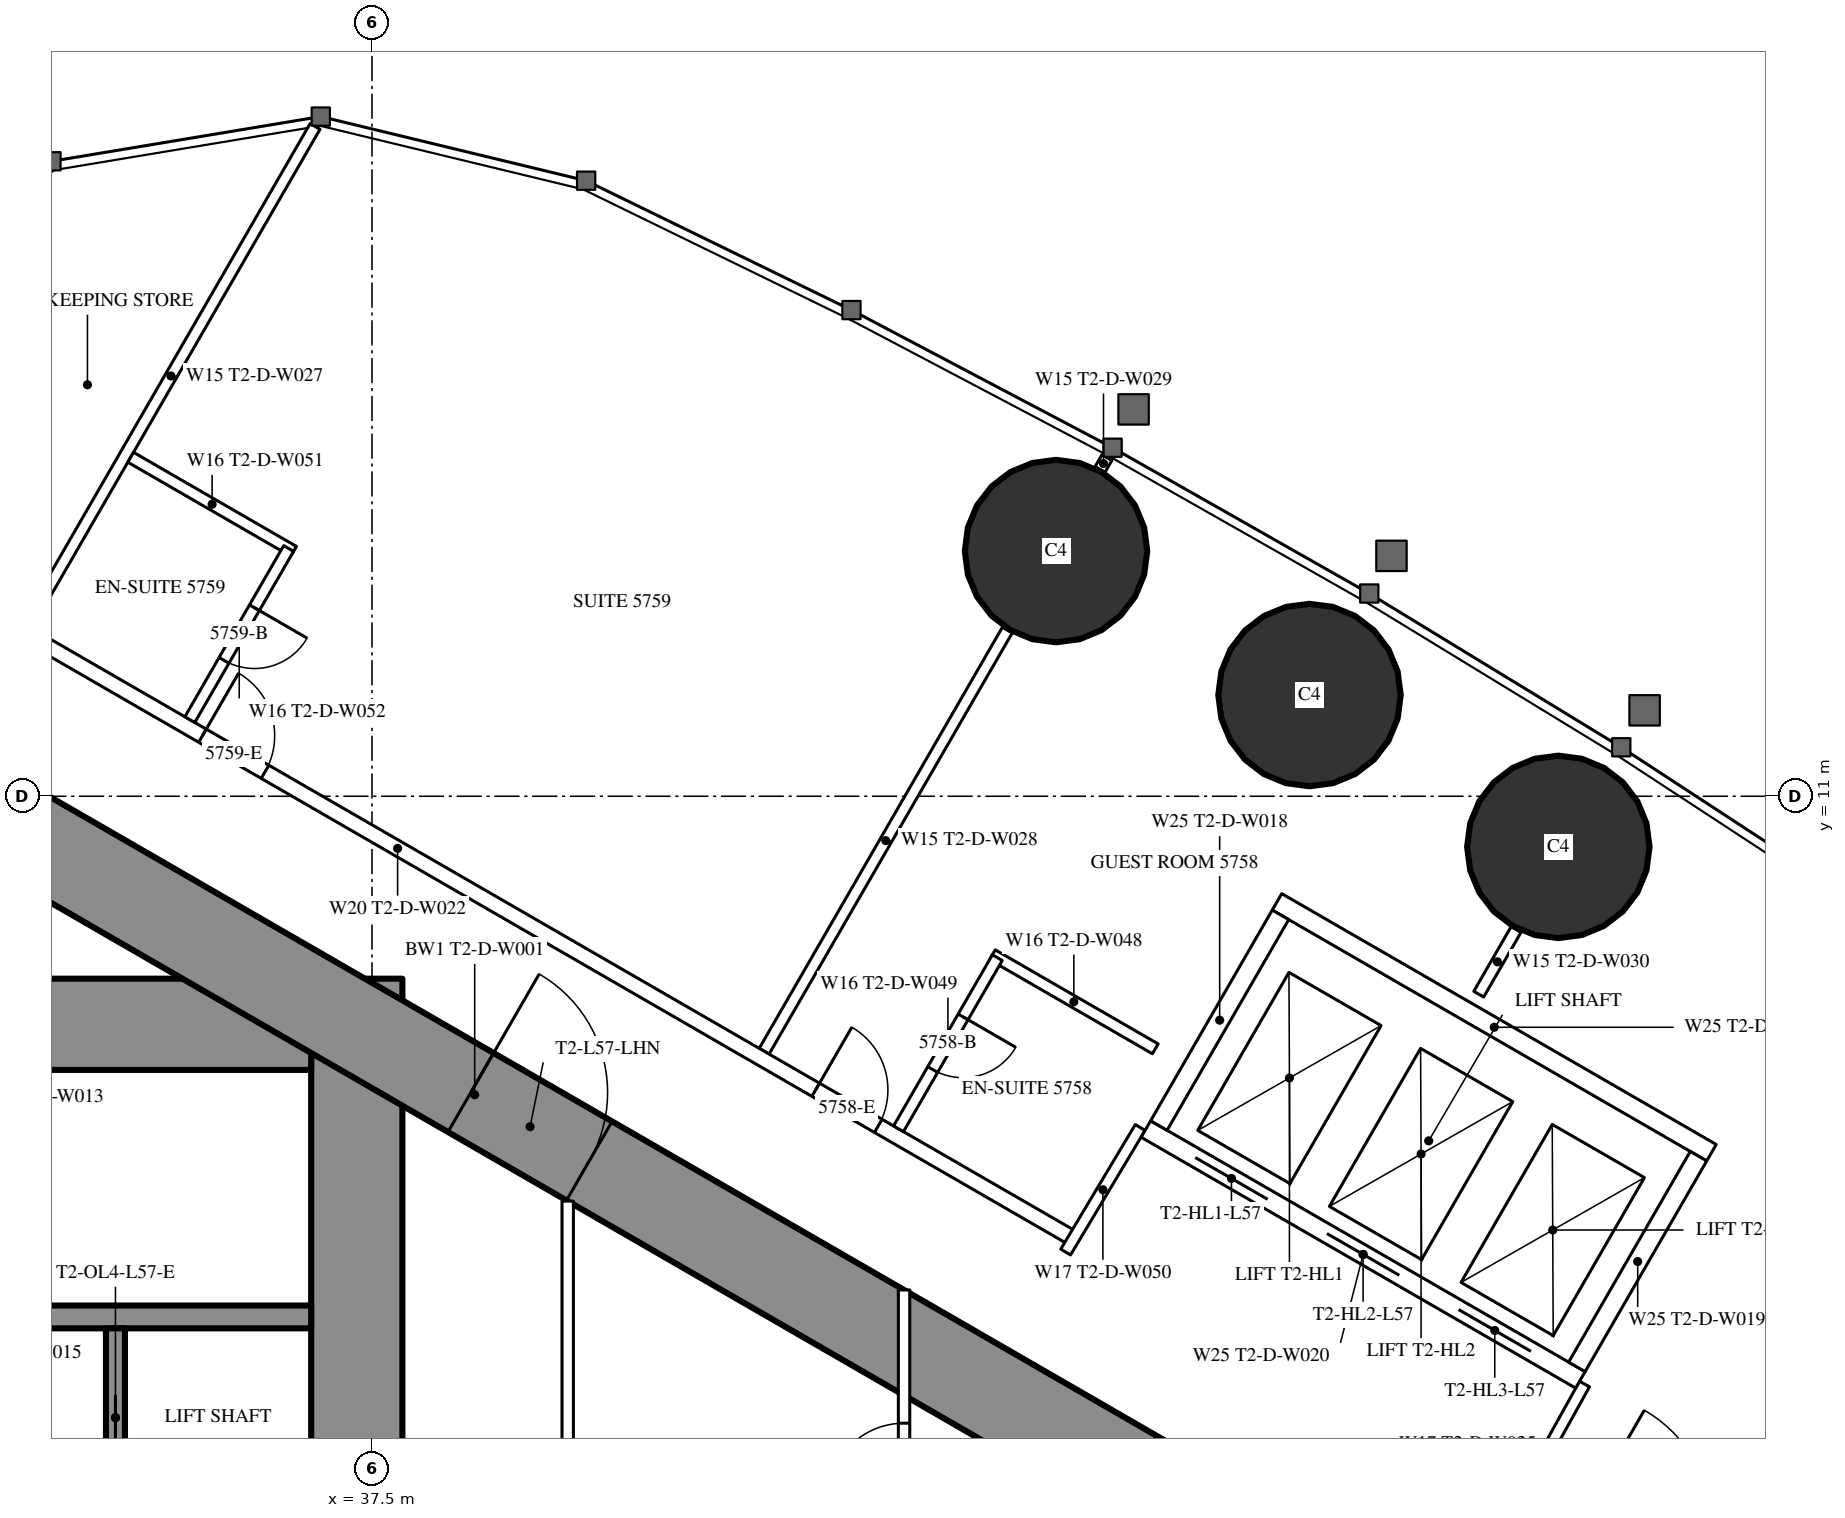
"""IFC4 building model, lengths in metres.
Left out: names, types, materials, properties, quantities, classifications, styles, units other than length and angle.
Written with IfcOpenShell. Run it as: python <this file> out.ifc"""

import sys

from ifc_helpers import new_model, si_unit, direction, frame, frame_2d, origin, origin_2d, place, context, subcontext, project, spatial, rectangle, circle, extrude, element, fill, save


model = new_model("IFC4")
c1 = context("Model", 3, precision=1e-05, world=origin(), true_north=direction((0.0, 1.0)))
c2 = subcontext(c1, "Body", "Model", "MODEL_VIEW")
j1 = project(units=[si_unit("LENGTHUNIT", "METRE"), si_unit("PLANEANGLEUNIT", "RADIAN")], contexts=[c1])
p1 = place(None, origin())
s1 = spatial("IfcSite", under=j1, at=p1, CompositionType="ELEMENT")
p2 = place(p1, origin())
s2 = spatial("IfcBuilding", under=s1, at=p2, CompositionType="ELEMENT")
p3 = place(p2, frame((0.0, 0.0, 215.3)))
s3 = spatial("IfcBuildingStorey", under=s2, at=p3, CompositionType="ELEMENT", Elevation=215.3)
for number, where, z_axis, x_axis in (
    (1, (53.108, 10.334, 0.0), (0.0, 0.0, 1.0), (1.0, 0.0, 0.0)),
    (2, (49.834, 12.332, 0.0), (0.0, 0.0, 1.0), (1.0, 0.0, 0.0)),
    (3, (46.499, 14.226, 0.0), (0.0, 0.0, 1.0), (1.0, 0.0, 0.0)),
):
    element("IfcColumn", number, at=place(p3, frame(where, z_axis=z_axis, x_axis=x_axis)), inside=s3, PredefinedType="COLUMN", context=c2, shape_type="SweptSolid", body=[
        extrude(circle(Radius=1.2, at=origin_2d()), origin(), (0.0, 0.0, 1.0), 3.6),
    ])
p4 = place(p3, frame((37.3, -8.6, 0.0), z_axis=(0.0, 0.0, 1.0), x_axis=(0.0, 1.0, 0.0)))
e4 = element("IfcWall", 4, at=p4, inside=s3, PredefinedType="SHEAR", context=c2, shape_type="SweptSolid", body=[
    extrude(rectangle(XDim=17.2, YDim=1.2, at=frame_2d((8.6, 0.0))), origin(), (0.0, 0.0, 1.0), 3.6),
])
p5 = place(p4, frame((7.7, 0.0, 0.0)))
e5 = element("IfcOpeningElement", 5, at=p5, cuts=e4, PredefinedType="OPENING", context=c2, shape_type="SweptSolid", body=[
    extrude(rectangle(XDim=1.8, YDim=2.2, at=frame_2d((0.9, 1.1))), frame((0.0, 0.61, 0.0), z_axis=(0.0, -1.0, 0.0), x_axis=(1.0, 0.0, 0.0)), (0.0, 0.0, 1.0), 1.22),
])
p6 = place(p3, frame((28.3, 8.0, 0.0), z_axis=(0.0, 0.0, 1.0), x_axis=(1.0, 0.0, 0.0)))
e6 = element("IfcWall", 6, at=p6, inside=s3, PredefinedType="SHEAR", context=c2, shape_type="SweptSolid", body=[
    extrude(rectangle(XDim=8.4, YDim=1.2, at=frame_2d((4.2, 0.0))), origin(), (0.0, 0.0, 1.0), 3.6),
])
p7 = place(p6, frame((0.25, 0.0, 0.0)))
e7 = element("IfcOpeningElement", 7, at=p7, cuts=e6, PredefinedType="OPENING", context=c2, shape_type="SweptSolid", body=[
    extrude(rectangle(XDim=1.0, YDim=2.2, at=frame_2d((0.5, 1.1))), frame((0.0, 0.61, 0.0), z_axis=(0.0, -1.0, 0.0), x_axis=(1.0, 0.0, 0.0)), (0.0, 0.0, 1.0), 1.22),
])
p8 = place(p3, frame((28.3, 4.15, 0.0), z_axis=(0.0, 0.0, 1.0), x_axis=(1.0, 0.0, 0.0)))
e8 = element("IfcWall", 8, at=p8, inside=s3, PredefinedType="SHEAR", context=c2, shape_type="SweptSolid", body=[
    extrude(rectangle(XDim=8.4, YDim=0.3, at=frame_2d((4.2, 0.0))), origin(), (0.0, 0.0, 1.0), 3.6),
])
p9 = place(p3, frame((34.125, 1.65, 0.0), z_axis=(0.0, 0.0, 1.0), x_axis=(0.0, 1.0, 0.0)))
e9 = element("IfcWall", 9, at=p9, inside=s3, PredefinedType="SHEAR", context=c2, shape_type="SweptSolid", body=[
    extrude(rectangle(XDim=2.35, YDim=0.25, at=frame_2d((1.175, 0.0))), origin(), (0.0, 0.0, 1.0), 3.6),
])
p10 = place(p9, frame((0.875, 0.0, 0.0)))
e10 = element("IfcOpeningElement", 10, at=p10, cuts=e9, PredefinedType="OPENING", context=c2, shape_type="SweptSolid", body=[
    extrude(rectangle(XDim=0.6, YDim=2.0, at=frame_2d((0.3, 1.0))), frame((0.0, 0.135, 0.0), z_axis=(0.0, -1.0, 0.0), x_axis=(1.0, 0.0, 0.0)), (0.0, 0.0, 1.0), 0.27),
])
p11 = place(p3, frame((27.2, 13.8, 0.0), z_axis=(0.0, 0.0, 1.0), x_axis=(0.866024515034, -0.500001539357, 0.0)))
e11 = element("IfcWall", 11, at=p11, inside=s3, PredefinedType="SHEAR", context=c2, shape_type="SweptSolid", body=[
    extrude(rectangle(XDim=26.907, YDim=1.2, at=frame_2d((13.454, 0.0))), origin(), (0.0, 0.0, 1.0), 3.6),
])
p12 = place(p11, frame((4.6, 0.0, 0.0)))
e12 = element("IfcOpeningElement", 12, at=p12, cuts=e11, PredefinedType="OPENING", context=c2, shape_type="SweptSolid", body=[
    extrude(rectangle(XDim=1.0, YDim=2.2, at=frame_2d((0.5, 1.1))), frame((0.0, 0.61, 0.0), z_axis=(0.0, -1.0, 0.0), x_axis=(1.0, 0.0, 0.0)), (0.0, 0.0, 1.0), 1.22),
])
p13 = place(p11, frame((13.395, 0.0, 0.0)))
e13 = element("IfcOpeningElement", 13, at=p13, cuts=e11, PredefinedType="OPENING", context=c2, shape_type="SweptSolid", body=[
    extrude(rectangle(XDim=1.8, YDim=2.2, at=frame_2d((0.9, 1.1))), frame((0.0, 0.61, 0.0), z_axis=(0.0, -1.0, 0.0), x_axis=(1.0, 0.0, 0.0)), (0.0, 0.0, 1.0), 1.22),
])
p14 = place(p3, frame((32.96, 13.246, 0.0), z_axis=(0.0, 0.0, 1.0), x_axis=(0.500000236886, 0.866025267018, 0.0)))
e14 = element("IfcWall", 14, at=p14, inside=s3, PredefinedType="PARTITIONING", context=c2, shape_type="SweptSolid", body=[
    extrude(rectangle(XDim=7.583, YDim=0.15, at=frame_2d((3.791, 0.0))), origin(), (0.0, 0.0, 1.0), 3.35),
])
p15 = place(p3, frame((42.66, 7.646, 0.0), z_axis=(0.0, 0.0, 1.0), x_axis=(0.499996592859, 0.866027370889, 0.0)))
e15 = element("IfcWall", 15, at=p15, inside=s3, PredefinedType="PARTITIONING", context=c2, shape_type="SweptSolid", body=[
    extrude(rectangle(XDim=6.398, YDim=0.15, at=frame_2d((3.199, 0.0))), origin(), (0.0, 0.0, 1.0), 2.45),
])
p16 = place(p3, frame((47.079, 15.3, 0.0), z_axis=(0.0, 0.0, 1.0), x_axis=(0.499212083968, 0.866479829667, 0.0)))
e16 = element("IfcWall", 16, at=p16, inside=s3, PredefinedType="PARTITIONING", context=c2, shape_type="SweptSolid", body=[
    extrude(rectangle(XDim=0.179, YDim=0.15, at=frame_2d((0.09, 0.0))), origin(), (0.0, 0.0, 1.0), 2.45),
])
p17 = place(p3, frame((52.06, 8.396, 0.0), z_axis=(0.0, 0.0, 1.0), x_axis=(0.500095379624, 0.865970329329, 0.0)))
e17 = element("IfcWall", 17, at=p17, inside=s3, PredefinedType="PARTITIONING", context=c2, shape_type="SweptSolid", body=[
    extrude(rectangle(XDim=0.982, YDim=0.15, at=frame_2d((0.491, 0.0))), origin(), (0.0, 0.0, 1.0), 3.35),
])
p18 = place(p3, frame((28.959, 15.44, 0.0), z_axis=(0.0, 0.0, 1.0), x_axis=(0.866028936079, -0.499993881836, 0.0)))
e18 = element("IfcWall", 18, at=p18, inside=s3, PredefinedType="PARTITIONING", context=c2, shape_type="SweptSolid", body=[
    extrude(rectangle(XDim=20.503, YDim=0.2, at=frame_2d((10.251, 0.0))), origin(), (0.0, 0.0, 1.0), 3.35),
])
p19 = place(p18, frame((16.603, 0.0, 0.0)))
e19 = element("IfcOpeningElement", 19, at=p19, cuts=e18, PredefinedType="OPENING", context=c2, shape_type="SweptSolid", body=[
    extrude(rectangle(XDim=0.95, YDim=2.2, at=frame_2d((0.475, 1.1))), frame((0.0, 0.11, 0.0), z_axis=(0.0, -1.0, 0.0), x_axis=(1.0, 0.0, 0.0)), (0.0, 0.0, 1.0), 0.22),
])
p20 = place(p18, frame((7.287, 0.0, 0.0)))
e20 = element("IfcOpeningElement", 20, at=p20, cuts=e18, PredefinedType="OPENING", context=c2, shape_type="SweptSolid", body=[
    extrude(rectangle(XDim=0.95, YDim=2.2, at=frame_2d((0.475, 1.1))), frame((0.0, 0.11, 0.0), z_axis=(0.0, -1.0, 0.0), x_axis=(1.0, 0.0, 0.0)), (0.0, 0.0, 1.0), 0.22),
])
p21 = place(p18, frame((2.244, 0.0, 0.0)))
e21 = element("IfcOpeningElement", 21, at=p21, cuts=e18, PredefinedType="OPENING", context=c2, shape_type="SweptSolid", body=[
    extrude(rectangle(XDim=1.8, YDim=2.2, at=frame_2d((0.9, 1.1))), frame((0.0, 0.11, 0.0), z_axis=(0.0, -1.0, 0.0), x_axis=(1.0, 0.0, 0.0)), (0.0, 0.0, 1.0), 0.22),
])
p22 = place(p3, frame((47.606, 6.642, 0.0), z_axis=(0.0, 0.0, 1.0), x_axis=(-0.51353662755, -0.858067673418, 0.0)))
e22 = element("IfcWall", 22, at=p22, inside=s3, PredefinedType="PARTITIONING", context=c2, shape_type="SweptSolid", body=[
    extrude(rectangle(XDim=1.91, YDim=0.15, at=frame_2d((0.955, 0.0))), origin(), (0.0, 0.0, 1.0), 3.35),
])
p23 = place(p3, frame((52.576, 1.689, 0.0), z_axis=(0.0, 0.0, 1.0), x_axis=(0.485424724123, 0.874278466629, 0.0)))
e23 = element("IfcWall", 23, at=p23, inside=s3, PredefinedType="PARTITIONING", context=c2, shape_type="SweptSolid", body=[
    extrude(rectangle(XDim=1.805, YDim=0.15, at=frame_2d((0.903, 0.0))), origin(), (0.0, 0.0, 1.0), 3.35),
])
p24 = place(p3, frame((45.662, 8.914, 0.0), z_axis=(0.0, 0.0, 1.0), x_axis=(0.86604923931, -0.499958713387, 0.0)))
e24 = element("IfcWall", 24, at=p24, inside=s3, PredefinedType="PARTITIONING", context=c2, shape_type="SweptSolid", body=[
    extrude(rectangle(XDim=2.475, YDim=0.15, at=frame_2d((1.237, 0.0))), origin(), (0.0, 0.0, 1.0), 3.35),
])
p25 = place(p3, frame((44.427, 6.625, 0.0), z_axis=(0.0, 0.0, 1.0), x_axis=(0.500006934395, 0.866021400173, 0.0)))
e25 = element("IfcWall", 25, at=p25, inside=s3, PredefinedType="PARTITIONING", context=c2, shape_type="SweptSolid", body=[
    extrude(rectangle(XDim=2.6, YDim=0.15, at=frame_2d((1.3, 0.0))), origin(), (0.0, 0.0, 1.0), 3.35),
])
p26 = place(p25, frame((0.9, 0.0, 0.0)))
e26 = element("IfcOpeningElement", 26, at=p26, cuts=e25, PredefinedType="OPENING", context=c2, shape_type="SweptSolid", body=[
    extrude(rectangle(XDim=0.8, YDim=2.2, at=frame_2d((0.4, 1.1))), frame((0.0, 0.085, 0.0), z_axis=(0.0, -1.0, 0.0), x_axis=(1.0, 0.0, 0.0)), (0.0, 0.0, 1.0), 0.17),
])
p27 = place(p3, frame((34.325, 15.46, 0.0), z_axis=(0.0, 0.0, 1.0), x_axis=(0.866031185235, -0.4999899861, 0.0)))
e27 = element("IfcWall", 27, at=p27, inside=s3, PredefinedType="PARTITIONING", context=c2, shape_type="SweptSolid", body=[
    extrude(rectangle(XDim=2.475, YDim=0.15, at=frame_2d((1.238, 0.0))), origin(), (0.0, 0.0, 1.0), 3.35),
])
p28 = place(p3, frame((35.104, 12.008, 0.0), z_axis=(0.0, 0.0, 1.0), x_axis=(0.500047596559, 0.865997922154, 0.0)))
e28 = element("IfcWall", 28, at=p28, inside=s3, PredefinedType="PARTITIONING", context=c2, shape_type="SweptSolid", body=[
    extrude(rectangle(XDim=2.6, YDim=0.15, at=frame_2d((1.3, 0.0))), origin(), (0.0, 0.0, 1.0), 3.35),
])
p29 = place(p28, frame((0.9, 0.0, 0.0)))
e29 = element("IfcOpeningElement", 29, at=p29, cuts=e28, PredefinedType="OPENING", context=c2, shape_type="SweptSolid", body=[
    extrude(rectangle(XDim=0.8, YDim=2.2, at=frame_2d((0.4, 1.1))), frame((0.0, 0.085, 0.0), z_axis=(0.0, -1.0, 0.0), x_axis=(1.0, 0.0, 0.0)), (0.0, 0.0, 1.0), 0.17),
])
p30 = place(p3, frame((40.075, -5.674, 0.0), z_axis=(0.0, 0.0, 1.0), x_axis=(0.0, 1.0, 0.0)))
e30 = element("IfcWall", 30, at=p30, inside=s3, PredefinedType="PARTITIONING", context=c2, shape_type="SweptSolid", body=[
    extrude(rectangle(XDim=11.348, YDim=0.15, at=frame_2d((5.674, 0.0))), origin(), (0.0, 0.0, 1.0), 3.35),
])
p31 = place(p30, frame((4.774, 0.0, 0.0)))
e31 = element("IfcOpeningElement", 31, at=p31, cuts=e30, PredefinedType="OPENING", context=c2, shape_type="SweptSolid", body=[
    extrude(rectangle(XDim=1.8, YDim=2.2, at=frame_2d((0.9, 1.1))), frame((0.0, 0.085, 0.0), z_axis=(0.0, -1.0, 0.0), x_axis=(1.0, 0.0, 0.0)), (0.0, 0.0, 1.0), 0.17),
])
p32 = place(p3, frame((44.5, -4.505, 0.0), z_axis=(0.0, 0.0, 1.0), x_axis=(0.0, 1.0, 0.0)))
e32 = element("IfcWall", 32, at=p32, inside=s3, PredefinedType="PARTITIONING", context=c2, shape_type="SweptSolid", body=[
    extrude(rectangle(XDim=9.009, YDim=0.15, at=frame_2d((4.505, 0.0))), origin(), (0.0, 0.0, 1.0), 3.35),
])
p33 = place(p32, frame((1.752, 0.0, 0.0)))
e33 = element("IfcOpeningElement", 33, at=p33, cuts=e32, PredefinedType="OPENING", context=c2, shape_type="SweptSolid", body=[
    extrude(rectangle(XDim=1.0, YDim=2.2, at=frame_2d((0.5, 1.1))), frame((0.0, 0.085, 0.0), z_axis=(0.0, -1.0, 0.0), x_axis=(1.0, 0.0, 0.0)), (0.0, 0.0, 1.0), 0.17),
])
p34 = place(p32, frame((6.257, 0.0, 0.0)))
e34 = element("IfcOpeningElement", 34, at=p34, cuts=e32, PredefinedType="OPENING", context=c2, shape_type="SweptSolid", body=[
    extrude(rectangle(XDim=1.0, YDim=2.2, at=frame_2d((0.5, 1.1))), frame((0.0, 0.085, 0.0), z_axis=(0.0, -1.0, 0.0), x_axis=(1.0, 0.0, 0.0)), (0.0, 0.0, 1.0), 0.17),
])
p35 = place(p3, frame((47.681, 6.622, 0.0), z_axis=(0.0, 0.0, 1.0), x_axis=(0.86603344179, -0.499986077507, 0.0)))
e35 = element("IfcWall", 35, at=p35, inside=s3, PredefinedType="PARTITIONING", context=c2, shape_type="SweptSolid", body=[
    extrude(rectangle(XDim=6.6, YDim=0.25, at=frame_2d((3.3, 0.0))), origin(), (0.0, 0.0, 1.0), 3.35),
])
p36 = place(p35, frame((0.75, 0.0, 0.0)))
e36 = element("IfcOpeningElement", 36, at=p36, cuts=e35, PredefinedType="OPENING", context=c2, shape_type="SweptSolid", body=[
    extrude(rectangle(XDim=1.1, YDim=2.2, at=frame_2d((0.55, 1.1))), frame((0.0, 0.135, 0.0), z_axis=(0.0, -1.0, 0.0), x_axis=(1.0, 0.0, 0.0)), (0.0, 0.0, 1.0), 0.27),
])
p37 = place(p35, frame((2.75, 0.0, 0.0)))
e37 = element("IfcOpeningElement", 37, at=p37, cuts=e35, PredefinedType="OPENING", context=c2, shape_type="SweptSolid", body=[
    extrude(rectangle(XDim=1.1, YDim=2.2, at=frame_2d((0.55, 1.1))), frame((0.0, 0.135, 0.0), z_axis=(0.0, -1.0, 0.0), x_axis=(1.0, 0.0, 0.0)), (0.0, 0.0, 1.0), 0.27),
])
p38 = place(p35, frame((4.75, 0.0, 0.0)))
e38 = element("IfcOpeningElement", 38, at=p38, cuts=e35, PredefinedType="OPENING", context=c2, shape_type="SweptSolid", body=[
    extrude(rectangle(XDim=1.1, YDim=2.2, at=frame_2d((0.55, 1.1))), frame((0.0, 0.135, 0.0), z_axis=(0.0, -1.0, 0.0), x_axis=(1.0, 0.0, 0.0)), (0.0, 0.0, 1.0), 0.27),
])
p39 = place(p3, frame((49.406, 9.611, 0.0), z_axis=(0.0, 0.0, 1.0), x_axis=(0.86603344179, -0.499986077507, 0.0)))
e39 = element("IfcWall", 39, at=p39, inside=s3, PredefinedType="PARTITIONING", context=c2, shape_type="SweptSolid", body=[
    extrude(rectangle(XDim=6.6, YDim=0.25, at=frame_2d((3.3, 0.0))), origin(), (0.0, 0.0, 1.0), 3.35),
])
p40 = place(p3, frame((47.852, 6.668, 0.0), z_axis=(0.0, 0.0, 1.0), x_axis=(0.499929347863, 0.866066190972, 0.0)))
e40 = element("IfcWall", 40, at=p40, inside=s3, PredefinedType="PARTITIONING", context=c2, shape_type="SweptSolid", body=[
    extrude(rectangle(XDim=3.201, YDim=0.25, at=frame_2d((1.6, 0.0))), origin(), (0.0, 0.0, 1.0), 3.35),
])
p41 = place(p3, frame((53.352, 3.493, 0.0), z_axis=(0.0, 0.0, 1.0), x_axis=(0.499872130319, 0.866099216793, 0.0)))
e41 = element("IfcWall", 41, at=p41, inside=s3, PredefinedType="PARTITIONING", context=c2, shape_type="SweptSolid", body=[
    extrude(rectangle(XDim=3.2, YDim=0.25, at=frame_2d((1.6, 0.0))), origin(), (0.0, 0.0, 1.0), 3.35),
])
p42 = place(p26, origin())
e42 = element("IfcDoor", 42, at=p42, inside=s3, OperationType="SINGLE_SWING_RIGHT", PredefinedType="DOOR", context=c2, shape_type="SweptSolid", body=[
    extrude(rectangle(XDim=0.8, YDim=2.2, at=frame_2d((0.4, 1.1))), frame((0.0, 0.025, 0.0), z_axis=(0.0, -1.0, 0.0), x_axis=(1.0, 0.0, 0.0)), (0.0, 0.0, 1.0), 0.05),
])
fill(e26, e42)
p43 = place(p19, origin())
e43 = element("IfcDoor", 43, at=p43, inside=s3, OperationType="SINGLE_SWING_LEFT", PredefinedType="DOOR", context=c2, shape_type="SweptSolid", body=[
    extrude(rectangle(XDim=0.95, YDim=2.2, at=frame_2d((0.475, 1.1))), frame((0.0, 0.025, 0.0), z_axis=(0.0, -1.0, 0.0), x_axis=(1.0, 0.0, 0.0)), (0.0, 0.0, 1.0), 0.05),
])
fill(e19, e43)
p44 = place(p29, origin())
e44 = element("IfcDoor", 44, at=p44, inside=s3, OperationType="SINGLE_SWING_RIGHT", PredefinedType="DOOR", context=c2, shape_type="SweptSolid", body=[
    extrude(rectangle(XDim=0.8, YDim=2.2, at=frame_2d((0.4, 1.1))), frame((0.0, 0.025, 0.0), z_axis=(0.0, -1.0, 0.0), x_axis=(1.0, 0.0, 0.0)), (0.0, 0.0, 1.0), 0.05),
])
fill(e29, e44)
p45 = place(p20, origin())
e45 = element("IfcDoor", 45, at=p45, inside=s3, OperationType="SINGLE_SWING_LEFT", PredefinedType="DOOR", context=c2, shape_type="SweptSolid", body=[
    extrude(rectangle(XDim=0.95, YDim=2.2, at=frame_2d((0.475, 1.1))), frame((0.0, 0.025, 0.0), z_axis=(0.0, -1.0, 0.0), x_axis=(1.0, 0.0, 0.0)), (0.0, 0.0, 1.0), 0.05),
])
fill(e20, e45)
p46 = place(p34, origin())
e46 = element("IfcDoor", 46, at=p46, inside=s3, OperationType="SINGLE_SWING_LEFT", PredefinedType="DOOR", context=c2, shape_type="SweptSolid", body=[
    extrude(rectangle(XDim=1.0, YDim=2.2, at=frame_2d((0.5, 1.1))), frame((0.0, 0.025, 0.0), z_axis=(0.0, -1.0, 0.0), x_axis=(1.0, 0.0, 0.0)), (0.0, 0.0, 1.0), 0.05),
])
fill(e34, e46)
p47 = place(p13, origin())
e47 = element("IfcDoor", 47, at=p47, inside=s3, OperationType="DOUBLE_DOOR_SINGLE_SWING", PredefinedType="DOOR", context=c2, shape_type="SweptSolid", body=[
    extrude(rectangle(XDim=1.8, YDim=2.2, at=frame_2d((0.9, 1.1))), frame((0.0, 0.025, 0.0), z_axis=(0.0, -1.0, 0.0), x_axis=(1.0, 0.0, 0.0)), (0.0, 0.0, 1.0), 0.05),
])
fill(e13, e47)
p48 = place(p10, origin())
e48 = element("IfcDoor", 48, at=p48, inside=s3, OperationType="SLIDING_TO_LEFT", PredefinedType="DOOR", context=c2, shape_type="SweptSolid", body=[
    extrude(rectangle(XDim=0.6, YDim=2.0, at=frame_2d((0.3, 1.0))), frame((0.0, 0.025, 0.0), z_axis=(0.0, -1.0, 0.0), x_axis=(1.0, 0.0, 0.0)), (0.0, 0.0, 1.0), 0.05),
])
fill(e10, e48)
p49 = place(p36, origin())
e49 = element("IfcDoor", 49, at=p49, inside=s3, OperationType="DOUBLE_DOOR_SLIDING", PredefinedType="USERDEFINED", context=c2, shape_type="SweptSolid", body=[
    extrude(rectangle(XDim=1.1, YDim=2.2, at=frame_2d((0.55, 1.1))), frame((0.0, 0.025, 0.0), z_axis=(0.0, -1.0, 0.0), x_axis=(1.0, 0.0, 0.0)), (0.0, 0.0, 1.0), 0.05),
])
fill(e36, e49)
p50 = place(p37, origin())
e50 = element("IfcDoor", 50, at=p50, inside=s3, OperationType="DOUBLE_DOOR_SLIDING", PredefinedType="USERDEFINED", context=c2, shape_type="SweptSolid", body=[
    extrude(rectangle(XDim=1.1, YDim=2.2, at=frame_2d((0.55, 1.1))), frame((0.0, 0.025, 0.0), z_axis=(0.0, -1.0, 0.0), x_axis=(1.0, 0.0, 0.0)), (0.0, 0.0, 1.0), 0.05),
])
fill(e37, e50)
p51 = place(p38, origin())
e51 = element("IfcDoor", 51, at=p51, inside=s3, OperationType="DOUBLE_DOOR_SLIDING", PredefinedType="USERDEFINED", context=c2, shape_type="SweptSolid", body=[
    extrude(rectangle(XDim=1.1, YDim=2.2, at=frame_2d((0.55, 1.1))), frame((0.0, 0.025, 0.0), z_axis=(0.0, -1.0, 0.0), x_axis=(1.0, 0.0, 0.0)), (0.0, 0.0, 1.0), 0.05),
])
fill(e38, e51)
save(model, sys.argv[1])
